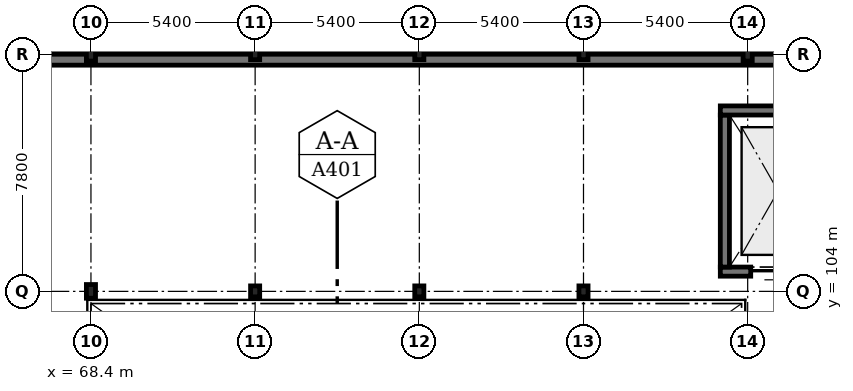
"""IFC4 building model, lengths in metres.
Left out: names, types, materials, properties, quantities, classifications, styles, units other than length and angle.
Written with IfcOpenShell. Run it as: python <this file> out.ifc"""

import sys

from ifc_helpers import new_model, si_unit, direction, frame, frame_2d, origin, origin_2d, place, context, subcontext, project, spatial, rectangle, i_section, extrude, element, fill, save


model = new_model("IFC4")
c1 = context("Model", 3, precision=1e-05, world=origin(), true_north=direction((0.0, 1.0)))
c2 = subcontext(c1, "Body", "Model", "MODEL_VIEW")
j1 = project(units=[si_unit("LENGTHUNIT", "METRE"), si_unit("PLANEANGLEUNIT", "RADIAN")], contexts=[c1])
p1 = place(None, origin())
s1 = spatial("IfcSite", under=j1, at=p1, CompositionType="ELEMENT")
p2 = place(p1, origin())
s2 = spatial("IfcBuilding", under=s1, at=p2, CompositionType="ELEMENT")
p3 = place(p2, frame((0.0, 0.0, 9.0)))
s3 = spatial("IfcBuildingStorey", under=s2, at=p3, CompositionType="ELEMENT", Elevation=9.0)
for number, where, z_axis, x_axis in (
    (1, (68.4, 104.0, 0.0), (0.0, 0.0, 1.0), (1.0, 0.0, 0.0)),
    (2, (68.4, 111.8, 0.0), (0.0, 0.0, 1.0), (1.0, 0.0, 0.0)),
):
    element("IfcColumn", number, at=place(p3, frame(where, z_axis=z_axis, x_axis=x_axis)), inside=s3, PredefinedType="COLUMN", context=c2, shape_type="SweptSolid", body=[
        extrude(i_section(OverallWidth=0.3, OverallDepth=0.45, WebThickness=0.014, FlangeThickness=0.026, FilletRadius=0.027, at=origin_2d()), origin(), (0.0, 0.0, 1.0), 4.2),
    ])
for number, where, z_axis, x_axis in (
    (3, (73.8, 104.0, 0.0), (0.0, 0.0, 1.0), (1.0, 0.0, 0.0)),
    (4, (73.8, 111.8, 0.0), (0.0, 0.0, 1.0), (1.0, 0.0, 0.0)),
    (5, (79.2, 104.0, 0.0), (0.0, 0.0, 1.0), (1.0, 0.0, 0.0)),
    (6, (79.2, 111.8, 0.0), (0.0, 0.0, 1.0), (1.0, 0.0, 0.0)),
    (7, (84.6, 104.0, 0.0), (0.0, 0.0, 1.0), (1.0, 0.0, 0.0)),
    (8, (84.6, 111.8, 0.0), (0.0, 0.0, 1.0), (1.0, 0.0, 0.0)),
):
    element("IfcColumn", number, at=place(p3, frame(where, z_axis=z_axis, x_axis=x_axis)), inside=s3, PredefinedType="COLUMN", context=c2, shape_type="SweptSolid", body=[
        extrude(i_section(OverallWidth=0.3, OverallDepth=0.36, WebThickness=0.012, FlangeThickness=0.022, FilletRadius=0.027, at=origin_2d()), origin(), (0.0, 0.0, 1.0), 4.2),
    ])
p4 = place(p3, frame((90.0, 111.8, 0.0), z_axis=(0.0, 0.0, 1.0), x_axis=(1.0, 0.0, 0.0)))
e9 = element("IfcColumn", 9, at=p4, inside=s3, PredefinedType="COLUMN", context=c2, shape_type="SweptSolid", body=[
    extrude(i_section(OverallWidth=0.3, OverallDepth=0.45, WebThickness=0.014, FlangeThickness=0.026, FilletRadius=0.027, at=origin_2d()), origin(), (0.0, 0.0, 1.0), 4.2),
])
p5 = place(p3, frame((92.9, 104.65, 0.0), z_axis=(0.0, 0.0, 1.0), x_axis=(-1.0, 0.0, 0.0)))
e10 = element("IfcWall", 10, at=p5, inside=s3, PredefinedType="SOLIDWALL", context=c2, shape_type="SweptSolid", body=[
    extrude(rectangle(XDim=3.8, YDim=0.3, at=frame_2d((1.9, 0.0))), origin(), (0.0, 0.0, 1.0), 4.2),
])
p6 = place(p5, frame((1.0, 0.0, 0.0)))
e11 = element("IfcOpeningElement", 11, at=p6, cuts=e10, PredefinedType="OPENING", context=c2, shape_type="SweptSolid", body=[
    extrude(rectangle(XDim=1.8, YDim=2.4, at=frame_2d((0.9, 1.2))), frame((0.0, 0.17, 0.0), z_axis=(0.0, -1.0, 0.0), x_axis=(1.0, 0.0, 0.0)), (0.0, 0.0, 1.0), 0.34),
])
p7 = place(p3, frame((89.25, 104.8, 0.0), z_axis=(0.0, 0.0, 1.0), x_axis=(0.0, 1.0, 0.0)))
e12 = element("IfcWall", 12, at=p7, inside=s3, PredefinedType="SOLIDWALL", context=c2, shape_type="SweptSolid", body=[
    extrude(rectangle(XDim=5.0, YDim=0.3, at=frame_2d((2.5, 0.0))), origin(), (0.0, 0.0, 1.0), 4.2),
])
p8 = place(p3, frame((89.1, 109.95, 0.0), z_axis=(0.0, 0.0, 1.0), x_axis=(1.0, 0.0, 0.0)))
e13 = element("IfcWall", 13, at=p8, inside=s3, PredefinedType="SOLIDWALL", context=c2, shape_type="SweptSolid", body=[
    extrude(rectangle(XDim=3.8, YDim=0.3, at=frame_2d((1.9, 0.0))), origin(), (0.0, 0.0, 1.0), 4.2),
])
p9 = place(p3, frame((57.6, 111.62, 0.0), z_axis=(0.0, 0.0, 1.0), x_axis=(1.0, 0.0, 0.0)))
e14 = element("IfcWall", 14, at=p9, inside=s3, PredefinedType="SOLIDWALL", context=c2, shape_type="SweptSolid", body=[
    extrude(rectangle(XDim=45.0, YDim=0.36, at=frame_2d((22.5, 0.0))), origin(), (0.0, 0.0, 1.0), 3.96),
])
p10 = place(p6, origin())
e15 = element("IfcDoor", 15, at=p10, inside=s3, OperationType="DOUBLE_DOOR_SLIDING", PredefinedType="DOOR", context=c2, shape_type="SweptSolid", body=[
    extrude(rectangle(XDim=1.8, YDim=2.4, at=frame_2d((0.9, 1.2))), frame((0.0, 0.025, 0.0), z_axis=(0.0, -1.0, 0.0), x_axis=(1.0, 0.0, 0.0)), (0.0, 0.0, 1.0), 0.05),
])
fill(e11, e15)
save(model, sys.argv[1])
